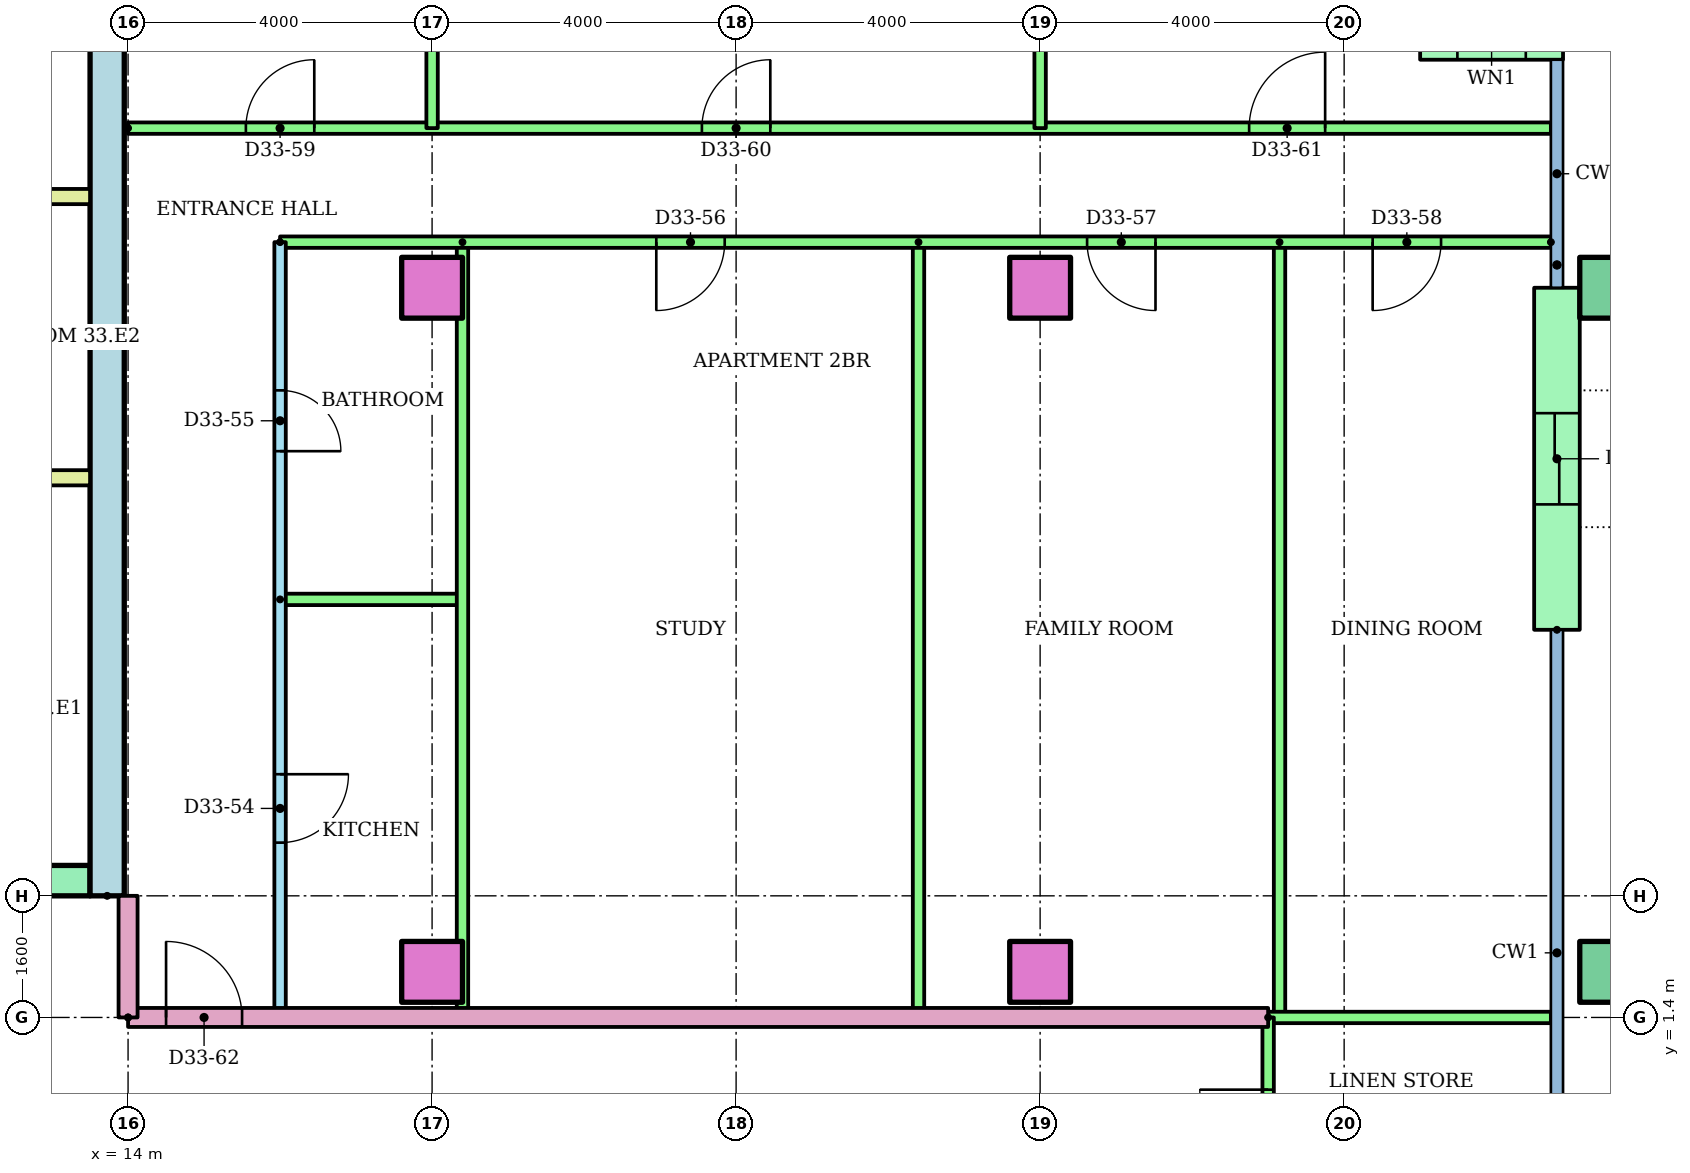
"""IFC4 building model, lengths in metres.
Left out: names, types, materials, properties, quantities, classifications, styles, units other than length and angle.
Written with IfcOpenShell. Run it as: python <this file> out.ifc"""

import sys

from ifc_helpers import new_model, si_unit, direction, frame, frame_2d, origin, origin_2d, place, context, subcontext, project, spatial, rectangle, hollow_rectangle, extrude, element, fill, save


model = new_model("IFC4")
c1 = context("Model", 3, precision=1e-05, world=origin(), true_north=direction((0.0, 1.0)))
c2 = subcontext(c1, "Body", "Model", "MODEL_VIEW")
j1 = project(units=[si_unit("LENGTHUNIT", "METRE"), si_unit("PLANEANGLEUNIT", "RADIAN")], contexts=[c1])
p1 = place(None, origin())
s1 = spatial("IfcSite", under=j1, at=p1, CompositionType="ELEMENT")
p2 = place(p1, origin())
s2 = spatial("IfcBuilding", under=s1, at=p2, CompositionType="ELEMENT")
p3 = place(p2, frame((0.0, 0.0, 129.4)))
s3 = spatial("IfcBuildingStorey", under=s2, at=p3, CompositionType="ELEMENT", Elevation=129.4)
for number, where in (
    (1, (18.0, 2.0, 0.0)),
    (2, (26.0, 2.0, 0.0)),
):
    element("IfcColumn", number, at=place(p3, frame(where)), inside=s3, PredefinedType="COLUMN", context=c2, shape_type="SweptSolid", body=[
        extrude(rectangle(XDim=0.8, YDim=0.8, at=origin_2d()), origin(), (0.0, 0.0, 1.0), 3.2),
    ])
p4 = place(p3, frame((33.5, 2.0, 0.0)))
e3 = element("IfcColumn", 3, at=p4, inside=s3, PredefinedType="COLUMN", context=c2, shape_type="SweptSolid", body=[
    extrude(hollow_rectangle(XDim=0.8, YDim=0.8, WallThickness=0.04, at=origin_2d()), origin(), (0.0, 0.0, 1.0), 3.2),
])
for number, where in (
    (4, (18.0, 11.0, 0.0)),
    (5, (26.0, 11.0, 0.0)),
):
    element("IfcColumn", number, at=place(p3, frame(where)), inside=s3, PredefinedType="COLUMN", context=c2, shape_type="SweptSolid", body=[
        extrude(rectangle(XDim=0.8, YDim=0.8, at=origin_2d()), origin(), (0.0, 0.0, 1.0), 3.2),
    ])
p5 = place(p3, frame((33.5, 11.0, 0.0)))
e6 = element("IfcColumn", 6, at=p5, inside=s3, PredefinedType="COLUMN", context=c2, shape_type="SweptSolid", body=[
    extrude(hollow_rectangle(XDim=0.8, YDim=0.8, WallThickness=0.04, at=origin_2d()), origin(), (0.0, 0.0, 1.0), 3.2),
])
p6 = place(p3, frame((32.88, 14.3, 0.0), z_axis=(0.0, 0.0, 1.0), x_axis=(-1.0, 0.0, 0.0)))
e7 = element("IfcWall", 7, at=p6, inside=s3, PredefinedType="STANDARD", context=c2, shape_type="SweptSolid", body=[
    extrude(rectangle(XDim=1.88, YDim=0.6, at=frame_2d((0.94, 0.0))), origin(), (0.0, 0.0, 1.0), 2.92),
])
p7 = place(p6, frame((0.49, 0.0, 0.9)))
e8 = element("IfcOpeningElement", 8, at=p7, cuts=e7, PredefinedType="OPENING", context=c2, shape_type="SweptSolid", body=[
    extrude(rectangle(XDim=0.9, YDim=1.5, at=frame_2d((0.45, 0.75))), frame((0.0, 0.31, 0.0), z_axis=(0.0, -1.0, 0.0), x_axis=(1.0, 0.0, 0.0)), (0.0, 0.0, 1.0), 0.62),
])
p8 = place(p3, frame((32.8, 6.5, 0.0), z_axis=(0.0, 0.0, 1.0), x_axis=(0.0, 1.0, 0.0)))
e9 = element("IfcWall", 9, at=p8, inside=s3, PredefinedType="STANDARD", context=c2, shape_type="SweptSolid", body=[
    extrude(rectangle(XDim=4.5, YDim=0.6, at=frame_2d((2.25, 0.0))), origin(), (0.0, 0.0, 1.0), 2.92),
])
p9 = place(p8, frame((1.65, 0.0, 0.0)))
e10 = element("IfcOpeningElement", 10, at=p9, cuts=e9, PredefinedType="OPENING", context=c2, shape_type="SweptSolid", body=[
    extrude(rectangle(XDim=1.2, YDim=2.1, at=frame_2d((0.6, 1.05))), frame((0.0, 0.31, 0.0), z_axis=(0.0, -1.0, 0.0), x_axis=(1.0, 0.0, 0.0)), (0.0, 0.0, 1.0), 0.62),
])
p10 = place(p3, frame((13.725, 3.0, 0.0), z_axis=(0.0, 0.0, 1.0), x_axis=(0.0, 1.0, 0.0)))
e11 = element("IfcWall", 11, at=p10, inside=s3, PredefinedType="SHEAR", context=c2, shape_type="SweptSolid", body=[
    extrude(rectangle(XDim=17.0, YDim=0.45, at=frame_2d((8.5, 0.0))), origin(), (0.0, 0.0, 1.0), 2.92),
])
p11 = place(p3, frame((-13.5, 3.2, 0.0)))
e12 = element("IfcWall", 12, at=p11, inside=s3, PredefinedType="SHEAR", context=c2, shape_type="SweptSolid", body=[
    extrude(rectangle(XDim=27.0, YDim=0.4, at=frame_2d((13.5, 0.0))), origin(), (0.0, 0.0, 1.0), 2.92),
])
p12 = place(p11, frame((6.861, 0.0, 0.0)))
e13 = element("IfcOpeningElement", 13, at=p12, cuts=e12, PredefinedType="OPENING", context=c2, shape_type="SweptSolid", body=[
    extrude(rectangle(XDim=1.1, YDim=2.1, at=frame_2d((0.55, 1.05))), frame((0.0, 0.21, 0.0), z_axis=(0.0, -1.0, 0.0), x_axis=(1.0, 0.0, 0.0)), (0.0, 0.0, 1.0), 0.42),
])
p13 = place(p11, frame((9.906, 0.0, 0.0)))
e14 = element("IfcOpeningElement", 14, at=p13, cuts=e12, PredefinedType="OPENING", context=c2, shape_type="SweptSolid", body=[
    extrude(rectangle(XDim=1.1, YDim=2.1, at=frame_2d((0.55, 1.05))), frame((0.0, 0.21, 0.0), z_axis=(0.0, -1.0, 0.0), x_axis=(1.0, 0.0, 0.0)), (0.0, 0.0, 1.0), 0.42),
])
p14 = place(p11, frame((15.994, 0.0, 0.0)))
e15 = element("IfcOpeningElement", 15, at=p14, cuts=e12, PredefinedType="OPENING", context=c2, shape_type="SweptSolid", body=[
    extrude(rectangle(XDim=1.1, YDim=2.1, at=frame_2d((0.55, 1.05))), frame((0.0, 0.21, 0.0), z_axis=(0.0, -1.0, 0.0), x_axis=(1.0, 0.0, 0.0)), (0.0, 0.0, 1.0), 0.42),
])
p15 = place(p11, frame((19.039, 0.0, 0.0)))
e16 = element("IfcOpeningElement", 16, at=p15, cuts=e12, PredefinedType="OPENING", context=c2, shape_type="SweptSolid", body=[
    extrude(rectangle(XDim=1.1, YDim=2.1, at=frame_2d((0.55, 1.05))), frame((0.0, 0.21, 0.0), z_axis=(0.0, -1.0, 0.0), x_axis=(1.0, 0.0, 0.0)), (0.0, 0.0, 1.0), 0.42),
])
p16 = place(p11, frame((12.6, 0.0, 0.0)))
e17 = element("IfcOpeningElement", 17, at=p16, cuts=e12, PredefinedType="OPENING", context=c2, shape_type="SweptSolid", body=[
    extrude(rectangle(XDim=1.8, YDim=2.1, at=frame_2d((0.9, 1.05))), frame((0.0, 0.21, 0.0), z_axis=(0.0, -1.0, 0.0), x_axis=(1.0, 0.0, 0.0)), (0.0, 0.0, 1.0), 0.42),
])
for number, where in (
    (18, (9.6, 8.5, 0.0)),
    (19, (9.6, 12.2, 0.0)),
):
    element("IfcWall", number, at=place(p3, frame(where)), inside=s3, PredefinedType="PARTITIONING", context=c2, shape_type="SweptSolid", body=[
        extrude(rectangle(XDim=3.9, YDim=0.2, at=frame_2d((1.95, 0.0))), origin(), (0.0, 0.0, 1.0), 2.92),
    ])
p17 = place(p3, frame((16.0, 11.6, 0.0), z_axis=(0.0, 0.0, 1.0), x_axis=(0.0, -1.0, 0.0)))
e20 = element("IfcWall", 20, at=p17, inside=s3, PredefinedType="PARTITIONING", context=c2, shape_type="SweptSolid", body=[
    extrude(rectangle(XDim=10.2, YDim=0.15, at=frame_2d((5.1, 0.0))), origin(), (0.0, 0.0, 1.0), 2.4),
])
p18 = place(p17, frame((7.0, 0.0, 0.0)))
e21 = element("IfcOpeningElement", 21, at=p18, cuts=e20, PredefinedType="OPENING", context=c2, shape_type="SweptSolid", body=[
    extrude(rectangle(XDim=0.9, YDim=2.1, at=frame_2d((0.45, 1.05))), frame((0.0, 0.085, 0.0), z_axis=(0.0, -1.0, 0.0), x_axis=(1.0, 0.0, 0.0)), (0.0, 0.0, 1.0), 0.17),
])
p19 = place(p17, frame((1.95, 0.0, 0.0)))
e22 = element("IfcOpeningElement", 22, at=p19, cuts=e20, PredefinedType="OPENING", context=c2, shape_type="SweptSolid", body=[
    extrude(rectangle(XDim=0.8, YDim=2.1, at=frame_2d((0.4, 1.05))), frame((0.0, 0.085, 0.0), z_axis=(0.0, -1.0, 0.0), x_axis=(1.0, 0.0, 0.0)), (0.0, 0.0, 1.0), 0.17),
])
p20 = place(p3, frame((16.0, 6.9, 0.0)))
e23 = element("IfcWall", 23, at=p20, inside=s3, PredefinedType="PARTITIONING", context=c2, shape_type="SweptSolid", body=[
    extrude(rectangle(XDim=2.4, YDim=0.15, at=frame_2d((1.2, 0.0))), origin(), (0.0, 0.0, 1.0), 2.4),
])
for number, where, z_axis, x_axis in (
    (24, (18.4, 11.6, 0.0), (0.0, 0.0, 1.0), (0.0, -1.0, 0.0)),
    (25, (24.4, 11.6, 0.0), (0.0, 0.0, 1.0), (0.0, -1.0, 0.0)),
    (26, (29.15, 11.6, 0.0), (0.0, 0.0, 1.0), (0.0, -1.0, 0.0)),
):
    element("IfcWall", number, at=place(p3, frame(where, z_axis=z_axis, x_axis=x_axis)), inside=s3, PredefinedType="PARTITIONING", context=c2, shape_type="SweptSolid", body=[
        extrude(rectangle(XDim=10.2, YDim=0.15, at=frame_2d((5.1, 0.0))), origin(), (0.0, 0.0, 1.0), 2.4),
    ])
p21 = place(p3, frame((32.72, 11.6, 0.0), z_axis=(0.0, 0.0, 1.0), x_axis=(-1.0, 0.0, 0.0)))
e27 = element("IfcWall", 27, at=p21, inside=s3, PredefinedType="PARTITIONING", context=c2, shape_type="SweptSolid", body=[
    extrude(rectangle(XDim=16.72, YDim=0.15, at=frame_2d((8.36, 0.0))), origin(), (0.0, 0.0, 1.0), 2.4),
])
p22 = place(p21, frame((10.87, 0.0, 0.0)))
e28 = element("IfcOpeningElement", 28, at=p22, cuts=e27, PredefinedType="OPENING", context=c2, shape_type="SweptSolid", body=[
    extrude(rectangle(XDim=0.9, YDim=2.1, at=frame_2d((0.45, 1.05))), frame((0.0, 0.085, 0.0), z_axis=(0.0, -1.0, 0.0), x_axis=(1.0, 0.0, 0.0)), (0.0, 0.0, 1.0), 0.17),
])
p23 = place(p21, frame((5.202, 0.0, 0.0)))
e29 = element("IfcOpeningElement", 29, at=p23, cuts=e27, PredefinedType="OPENING", context=c2, shape_type="SweptSolid", body=[
    extrude(rectangle(XDim=0.9, YDim=2.1, at=frame_2d((0.45, 1.05))), frame((0.0, 0.085, 0.0), z_axis=(0.0, -1.0, 0.0), x_axis=(1.0, 0.0, 0.0)), (0.0, 0.0, 1.0), 0.17),
])
p24 = place(p21, frame((1.445, 0.0, 0.0)))
e30 = element("IfcOpeningElement", 30, at=p24, cuts=e27, PredefinedType="OPENING", context=c2, shape_type="SweptSolid", body=[
    extrude(rectangle(XDim=0.9, YDim=2.1, at=frame_2d((0.45, 1.05))), frame((0.0, 0.085, 0.0), z_axis=(0.0, -1.0, 0.0), x_axis=(1.0, 0.0, 0.0)), (0.0, 0.0, 1.0), 0.17),
])
p25 = place(p3, frame((14.0, 13.1, 0.0)))
e31 = element("IfcWall", 31, at=p25, inside=s3, PredefinedType="PARTITIONING", context=c2, shape_type="SweptSolid", body=[
    extrude(rectangle(XDim=18.72, YDim=0.15, at=frame_2d((9.36, 0.0))), origin(), (0.0, 0.0, 1.0), 2.4),
])
p26 = place(p25, frame((1.55, 0.0, 0.0)))
e32 = element("IfcOpeningElement", 32, at=p26, cuts=e31, PredefinedType="OPENING", context=c2, shape_type="SweptSolid", body=[
    extrude(rectangle(XDim=0.9, YDim=2.1, at=frame_2d((0.45, 1.05))), frame((0.0, 0.085, 0.0), z_axis=(0.0, -1.0, 0.0), x_axis=(1.0, 0.0, 0.0)), (0.0, 0.0, 1.0), 0.17),
])
p27 = place(p25, frame((7.55, 0.0, 0.0)))
e33 = element("IfcOpeningElement", 33, at=p27, cuts=e31, PredefinedType="OPENING", context=c2, shape_type="SweptSolid", body=[
    extrude(rectangle(XDim=0.9, YDim=2.1, at=frame_2d((0.45, 1.05))), frame((0.0, 0.085, 0.0), z_axis=(0.0, -1.0, 0.0), x_axis=(1.0, 0.0, 0.0)), (0.0, 0.0, 1.0), 0.17),
])
p28 = place(p25, frame((14.75, 0.0, 0.0)))
e34 = element("IfcOpeningElement", 34, at=p28, cuts=e31, PredefinedType="OPENING", context=c2, shape_type="SweptSolid", body=[
    extrude(rectangle(XDim=1.0, YDim=2.1, at=frame_2d((0.5, 1.05))), frame((0.0, 0.085, 0.0), z_axis=(0.0, -1.0, 0.0), x_axis=(1.0, 0.0, 0.0)), (0.0, 0.0, 1.0), 0.17),
])
for number, where, z_axis, x_axis in (
    (35, (18.0, 18.721, 0.0), (0.0, 0.0, 1.0), (0.0, -1.0, 0.0)),
    (36, (26.0, 18.721, 0.0), (0.0, 0.0, 1.0), (0.0, -1.0, 0.0)),
):
    element("IfcWall", number, at=place(p3, frame(where, z_axis=z_axis, x_axis=x_axis)), inside=s3, PredefinedType="PARTITIONING", context=c2, shape_type="SweptSolid", body=[
        extrude(rectangle(XDim=5.621, YDim=0.15, at=frame_2d((2.811, 0.0))), origin(), (0.0, 0.0, 1.0), 2.4),
    ])
p29 = place(p3, frame((14.0, 1.4, 0.0)))
e37 = element("IfcWall", 37, at=p29, inside=s3, PredefinedType="PARTITIONING", context=c2, shape_type="SweptSolid", body=[
    extrude(rectangle(XDim=15.0, YDim=0.25, at=frame_2d((7.5, 0.0))), origin(), (0.0, 0.0, 1.0), 2.4),
])
p30 = place(p29, frame((0.5, 0.0, 0.0)))
e38 = element("IfcOpeningElement", 38, at=p30, cuts=e37, PredefinedType="OPENING", context=c2, shape_type="SweptSolid", body=[
    extrude(rectangle(XDim=1.0, YDim=2.1, at=frame_2d((0.5, 1.05))), frame((0.0, 0.135, 0.0), z_axis=(0.0, -1.0, 0.0), x_axis=(1.0, 0.0, 0.0)), (0.0, 0.0, 1.0), 0.27),
])
p31 = place(p3, frame((29.0, 1.4, 0.0)))
e39 = element("IfcWall", 39, at=p31, inside=s3, PredefinedType="PARTITIONING", context=c2, shape_type="SweptSolid", body=[
    extrude(rectangle(XDim=3.72, YDim=0.15, at=frame_2d((1.86, 0.0))), origin(), (0.0, 0.0, 1.0), 2.4),
])
p32 = place(p3, frame((29.0, -1.4, 0.0), z_axis=(0.0, 0.0, 1.0), x_axis=(0.0, 1.0, 0.0)))
e40 = element("IfcWall", 40, at=p32, inside=s3, PredefinedType="PARTITIONING", context=c2, shape_type="SweptSolid", body=[
    extrude(rectangle(XDim=2.8, YDim=0.15, at=frame_2d((1.4, 0.0))), origin(), (0.0, 0.0, 1.0), 2.4),
])
p33 = place(p32, frame((0.95, 0.0, 0.0)))
e41 = element("IfcOpeningElement", 41, at=p33, cuts=e40, PredefinedType="OPENING", context=c2, shape_type="SweptSolid", body=[
    extrude(rectangle(XDim=0.9, YDim=2.1, at=frame_2d((0.45, 1.05))), frame((0.0, 0.085, 0.0), z_axis=(0.0, -1.0, 0.0), x_axis=(1.0, 0.0, 0.0)), (0.0, 0.0, 1.0), 0.17),
])
p34 = place(p3, frame((14.0, 1.4, 0.0), z_axis=(0.0, 0.0, 1.0), x_axis=(0.0, 1.0, 0.0)))
e42 = element("IfcWall", 42, at=p34, inside=s3, PredefinedType="PARTITIONING", context=c2, shape_type="SweptSolid", body=[
    extrude(rectangle(XDim=1.6, YDim=0.25, at=frame_2d((0.8, 0.0))), origin(), (0.0, 0.0, 1.0), 2.4),
])
p35 = place(p18, origin())
e43 = element("IfcDoor", 43, at=p35, inside=s3, OperationType="SINGLE_SWING_LEFT", PredefinedType="DOOR", context=c2, shape_type="SweptSolid", body=[
    extrude(rectangle(XDim=0.9, YDim=2.1, at=frame_2d((0.45, 1.05))), frame((0.0, 0.025, 0.0), z_axis=(0.0, -1.0, 0.0), x_axis=(1.0, 0.0, 0.0)), (0.0, 0.0, 1.0), 0.05),
])
fill(e21, e43)
p36 = place(p19, origin())
e44 = element("IfcDoor", 44, at=p36, inside=s3, OperationType="SINGLE_SWING_RIGHT", PredefinedType="DOOR", context=c2, shape_type="SweptSolid", body=[
    extrude(rectangle(XDim=0.8, YDim=2.1, at=frame_2d((0.4, 1.05))), frame((0.0, 0.025, 0.0), z_axis=(0.0, -1.0, 0.0), x_axis=(1.0, 0.0, 0.0)), (0.0, 0.0, 1.0), 0.05),
])
fill(e22, e44)
p37 = place(p22, origin())
e45 = element("IfcDoor", 45, at=p37, inside=s3, OperationType="SINGLE_SWING_RIGHT", PredefinedType="DOOR", context=c2, shape_type="SweptSolid", body=[
    extrude(rectangle(XDim=0.9, YDim=2.1, at=frame_2d((0.45, 1.05))), frame((0.0, 0.025, 0.0), z_axis=(0.0, -1.0, 0.0), x_axis=(1.0, 0.0, 0.0)), (0.0, 0.0, 1.0), 0.05),
])
fill(e28, e45)
p38 = place(p23, origin())
e46 = element("IfcDoor", 46, at=p38, inside=s3, OperationType="SINGLE_SWING_LEFT", PredefinedType="DOOR", context=c2, shape_type="SweptSolid", body=[
    extrude(rectangle(XDim=0.9, YDim=2.1, at=frame_2d((0.45, 1.05))), frame((0.0, 0.025, 0.0), z_axis=(0.0, -1.0, 0.0), x_axis=(1.0, 0.0, 0.0)), (0.0, 0.0, 1.0), 0.05),
])
fill(e29, e46)
p39 = place(p24, origin())
e47 = element("IfcDoor", 47, at=p39, inside=s3, OperationType="SINGLE_SWING_RIGHT", PredefinedType="DOOR", context=c2, shape_type="SweptSolid", body=[
    extrude(rectangle(XDim=0.9, YDim=2.1, at=frame_2d((0.45, 1.05))), frame((0.0, 0.025, 0.0), z_axis=(0.0, -1.0, 0.0), x_axis=(1.0, 0.0, 0.0)), (0.0, 0.0, 1.0), 0.05),
])
fill(e30, e47)
p40 = place(p26, origin())
e48 = element("IfcDoor", 48, at=p40, inside=s3, OperationType="SINGLE_SWING_RIGHT", PredefinedType="DOOR", context=c2, shape_type="SweptSolid", body=[
    extrude(rectangle(XDim=0.9, YDim=2.1, at=frame_2d((0.45, 1.05))), frame((0.0, 0.025, 0.0), z_axis=(0.0, -1.0, 0.0), x_axis=(1.0, 0.0, 0.0)), (0.0, 0.0, 1.0), 0.05),
])
fill(e32, e48)
p41 = place(p27, origin())
e49 = element("IfcDoor", 49, at=p41, inside=s3, OperationType="SINGLE_SWING_RIGHT", PredefinedType="DOOR", context=c2, shape_type="SweptSolid", body=[
    extrude(rectangle(XDim=0.9, YDim=2.1, at=frame_2d((0.45, 1.05))), frame((0.0, 0.025, 0.0), z_axis=(0.0, -1.0, 0.0), x_axis=(1.0, 0.0, 0.0)), (0.0, 0.0, 1.0), 0.05),
])
fill(e33, e49)
p42 = place(p28, origin())
e50 = element("IfcDoor", 50, at=p42, inside=s3, OperationType="SINGLE_SWING_RIGHT", PredefinedType="DOOR", context=c2, shape_type="SweptSolid", body=[
    extrude(rectangle(XDim=1.0, YDim=2.1, at=frame_2d((0.5, 1.05))), frame((0.0, 0.025, 0.0), z_axis=(0.0, -1.0, 0.0), x_axis=(1.0, 0.0, 0.0)), (0.0, 0.0, 1.0), 0.05),
])
fill(e34, e50)
p43 = place(p30, origin())
e51 = element("IfcDoor", 51, at=p43, inside=s3, OperationType="SINGLE_SWING_LEFT", PredefinedType="DOOR", context=c2, shape_type="SweptSolid", body=[
    extrude(rectangle(XDim=1.0, YDim=2.1, at=frame_2d((0.5, 1.05))), frame((0.0, 0.025, 0.0), z_axis=(0.0, -1.0, 0.0), x_axis=(1.0, 0.0, 0.0)), (0.0, 0.0, 1.0), 0.05),
])
fill(e38, e51)
p44 = place(p33, origin())
e52 = element("IfcDoor", 52, at=p44, inside=s3, OperationType="SINGLE_SWING_RIGHT", PredefinedType="DOOR", context=c2, shape_type="SweptSolid", body=[
    extrude(rectangle(XDim=0.9, YDim=2.1, at=frame_2d((0.45, 1.05))), frame((0.0, 0.025, 0.0), z_axis=(0.0, -1.0, 0.0), x_axis=(1.0, 0.0, 0.0)), (0.0, 0.0, 1.0), 0.05),
])
fill(e41, e52)
p45 = place(p9, origin())
e53 = element("IfcDoor", 53, at=p45, inside=s3, OperationType="SLIDING_TO_LEFT", PredefinedType="DOOR", context=c2, shape_type="SweptSolid", body=[
    extrude(rectangle(XDim=1.2, YDim=2.1, at=frame_2d((0.6, 1.05))), frame((0.0, 0.025, 0.0), z_axis=(0.0, -1.0, 0.0), x_axis=(1.0, 0.0, 0.0)), (0.0, 0.0, 1.0), 0.05),
])
fill(e10, e53)
save(model, sys.argv[1])
